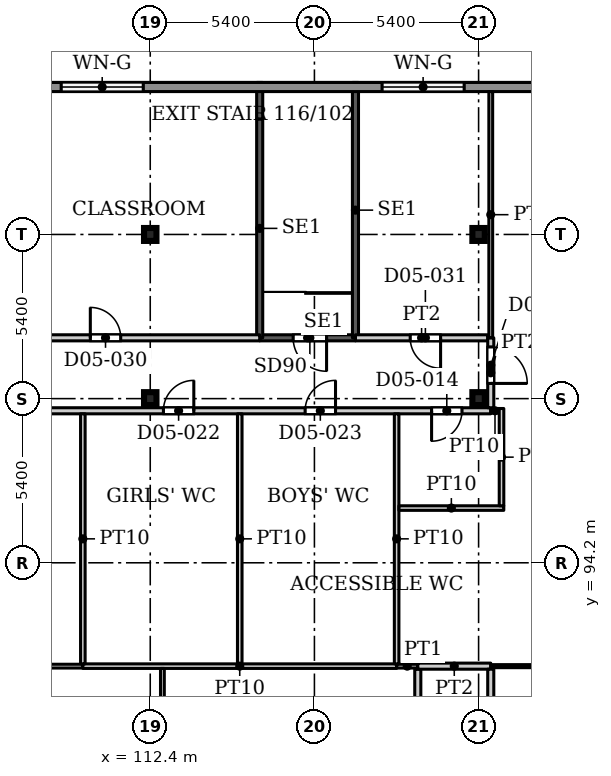
"""IFC4 building model, lengths in metres.
Left out: names, types, materials, properties, quantities, classifications, styles, units other than length and angle.
Written with IfcOpenShell. Run it as: python <this file> out.ifc"""

import sys

from ifc_helpers import new_model, si_unit, direction, frame, frame_2d, origin, origin_2d, place, context, subcontext, project, spatial, rectangle, i_section, extrude, source, transform, mapped, element, fill, save


model = new_model("IFC4")
c1 = context("Model", 3, precision=1e-05, world=origin(), true_north=direction((0.0, 1.0)))
c2 = subcontext(c1, "Body", "Model", "MODEL_VIEW")
j1 = project(units=[si_unit("LENGTHUNIT", "METRE"), si_unit("PLANEANGLEUNIT", "RADIAN")], contexts=[c1])
p1 = place(None, origin())
s1 = spatial("IfcSite", under=j1, at=p1, CompositionType="ELEMENT")
p2 = place(p1, origin())
s2 = spatial("IfcBuilding", under=s1, at=p2, CompositionType="ELEMENT")
p3 = place(p2, frame((0.0, 0.0, 26.0)))
s3 = spatial("IfcBuildingStorey", under=s2, at=p3, CompositionType="ELEMENT", Elevation=26.0)
for number, where, z_axis, x_axis in (
    (1, (112.4, 99.6, 0.0), (0.0, 0.0, 1.0), (1.0, 0.0, 0.0)),
    (2, (123.2, 99.6, 0.0), (0.0, 0.0, 1.0), (1.0, 0.0, 0.0)),
    (3, (112.4, 105.0, 0.0), (0.0, 0.0, 1.0), (1.0, 0.0, 0.0)),
    (4, (123.2, 105.0, 0.0), (0.0, 0.0, 1.0), (1.0, 0.0, 0.0)),
):
    element("IfcColumn", number, at=place(p3, frame(where, z_axis=z_axis, x_axis=x_axis)), inside=s3, PredefinedType="COLUMN", context=c2, shape_type="SweptSolid", body=[
        extrude(i_section(OverallWidth=0.409, OverallDepth=0.425, WebThickness=0.033, FlangeThickness=0.052, FilletRadius=0.013, at=origin_2d()), origin(), (0.0, 0.0, 1.0), 4.5),
    ])
p4 = place(p3, frame((78.48, 109.85, 0.0), z_axis=(0.0, 0.0, 1.0), x_axis=(1.0, 0.0, 0.0)))
e5 = element("IfcWall", 5, at=p4, inside=s3, PredefinedType="SOLIDWALL", context=c2, shape_type="SweptSolid", body=[
    extrude(rectangle(XDim=47.52, YDim=0.3, at=frame_2d((23.76, 0.0))), origin(), (0.0, 0.0, 1.0), 4.25),
])
p5 = place(p4, frame((1.045, 0.0, 2.4)))
e6 = element("IfcOpeningElement", 6, at=p5, cuts=e5, PredefinedType="OPENING", context=c2, shape_type="SweptSolid", body=[
    extrude(rectangle(XDim=2.7, YDim=1.2, at=frame_2d((1.35, 0.6))), frame((0.0, 0.16, 0.0), z_axis=(0.0, -1.0, 0.0), x_axis=(1.0, 0.0, 0.0)), (0.0, 0.0, 1.0), 0.32),
])
p6 = place(p4, frame((6.28, 0.0, 2.4)))
e7 = element("IfcOpeningElement", 7, at=p6, cuts=e5, PredefinedType="OPENING", context=c2, shape_type="SweptSolid", body=[
    extrude(rectangle(XDim=2.7, YDim=1.2, at=frame_2d((1.35, 0.6))), frame((0.0, 0.16, 0.0), z_axis=(0.0, -1.0, 0.0), x_axis=(1.0, 0.0, 0.0)), (0.0, 0.0, 1.0), 0.32),
])
p7 = place(p4, frame((15.765, 0.0, 2.4)))
e8 = element("IfcOpeningElement", 8, at=p7, cuts=e5, PredefinedType="OPENING", context=c2, shape_type="SweptSolid", body=[
    extrude(rectangle(XDim=2.7, YDim=1.2, at=frame_2d((1.35, 0.6))), frame((0.0, 0.16, 0.0), z_axis=(0.0, -1.0, 0.0), x_axis=(1.0, 0.0, 0.0)), (0.0, 0.0, 1.0), 0.32),
])
p8 = place(p4, frame((22.47, 0.0, 2.4)))
e9 = element("IfcOpeningElement", 9, at=p8, cuts=e5, PredefinedType="OPENING", context=c2, shape_type="SweptSolid", body=[
    extrude(rectangle(XDim=2.7, YDim=1.2, at=frame_2d((1.35, 0.6))), frame((0.0, 0.16, 0.0), z_axis=(0.0, -1.0, 0.0), x_axis=(1.0, 0.0, 0.0)), (0.0, 0.0, 1.0), 0.32),
])
p9 = place(p4, frame((30.99, 0.0, 2.4)))
e10 = element("IfcOpeningElement", 10, at=p9, cuts=e5, PredefinedType="OPENING", context=c2, shape_type="SweptSolid", body=[
    extrude(rectangle(XDim=2.7, YDim=1.2, at=frame_2d((1.35, 0.6))), frame((0.0, 0.16, 0.0), z_axis=(0.0, -1.0, 0.0), x_axis=(1.0, 0.0, 0.0)), (0.0, 0.0, 1.0), 0.32),
])
p10 = place(p4, frame((41.545, 0.0, 2.4)))
e11 = element("IfcOpeningElement", 11, at=p10, cuts=e5, PredefinedType="OPENING", context=c2, shape_type="SweptSolid", body=[
    extrude(rectangle(XDim=2.7, YDim=1.2, at=frame_2d((1.35, 0.6))), frame((0.0, 0.16, 0.0), z_axis=(0.0, -1.0, 0.0), x_axis=(1.0, 0.0, 0.0)), (0.0, 0.0, 1.0), 0.32),
])
p11 = place(p3, frame((116.0, 101.6, 0.0), z_axis=(0.0, 0.0, 1.0), x_axis=(1.0, 0.0, 0.0)))
e12 = element("IfcWall", 12, at=p11, inside=s3, PredefinedType="SHEAR", context=c2, shape_type="SweptSolid", body=[
    extrude(rectangle(XDim=3.15, YDim=0.2, at=frame_2d((1.575, 0.0))), origin(), (0.0, 0.0, 1.0), 4.5),
])
p12 = place(p11, frame((1.1, 0.0, 0.0)))
e13 = element("IfcOpeningElement", 13, at=p12, cuts=e12, PredefinedType="OPENING", context=c2, shape_type="SweptSolid", body=[
    extrude(rectangle(XDim=1.1, YDim=2.2, at=frame_2d((0.55, 1.1))), frame((0.0, 0.11, 0.0), z_axis=(0.0, -1.0, 0.0), x_axis=(1.0, 0.0, 0.0)), (0.0, 0.0, 1.0), 0.22),
])
p13 = place(p3, frame((116.0, 101.6, 0.0), z_axis=(0.0, 0.0, 1.0), x_axis=(0.0, 1.0, 0.0)))
e14 = element("IfcWall", 14, at=p13, inside=s3, PredefinedType="SHEAR", context=c2, shape_type="SweptSolid", body=[
    extrude(rectangle(XDim=7.2, YDim=0.2, at=frame_2d((3.6, 0.0))), origin(), (0.0, 0.0, 1.0), 4.5),
])
p14 = place(p3, frame((116.0, 108.8, 0.0), z_axis=(0.0, 0.0, 1.0), x_axis=(0.0, 1.0, 0.0)))
e15 = element("IfcWall", 15, at=p14, inside=s3, PredefinedType="SHEAR", context=c2, shape_type="SweptSolid", body=[
    extrude(rectangle(XDim=1.2, YDim=0.2, at=frame_2d((0.6, 0.0))), origin(), (0.0, 0.0, 1.0), 4.5),
])
p15 = place(p3, frame((119.15, 101.6, 0.0), z_axis=(0.0, 0.0, 1.0), x_axis=(0.0, 1.0, 0.0)))
e16 = element("IfcWall", 16, at=p15, inside=s3, PredefinedType="SHEAR", context=c2, shape_type="SweptSolid", body=[
    extrude(rectangle(XDim=8.4, YDim=0.2, at=frame_2d((4.2, 0.0))), origin(), (0.0, 0.0, 1.0), 4.5),
])
p16 = place(p3, frame((56.1, 99.2, 0.0), z_axis=(0.0, 0.0, 1.0), x_axis=(1.0, 0.0, 0.0)))
e17 = element("IfcWall", 17, at=p16, inside=s3, PredefinedType="PARTITIONING", context=c2, shape_type="SweptSolid", body=[
    extrude(rectangle(XDim=67.5, YDim=0.2, at=frame_2d((33.75, 0.0))), origin(), (0.0, 0.0, 1.0), 4.2),
])
p17 = place(p16, frame((4.05, 0.0, 0.0)))
e18 = element("IfcOpeningElement", 18, at=p17, cuts=e17, PredefinedType="OPENING", context=c2, shape_type="SweptSolid", body=[
    extrude(rectangle(XDim=1.0, YDim=2.1, at=frame_2d((0.5, 1.05))), frame((0.0, 0.11, 0.0), z_axis=(0.0, -1.0, 0.0), x_axis=(1.0, 0.0, 0.0)), (0.0, 0.0, 1.0), 0.22),
])
p18 = place(p16, frame((65.554, 0.0, 0.0)))
e19 = element("IfcOpeningElement", 19, at=p18, cuts=e17, PredefinedType="OPENING", context=c2, shape_type="SweptSolid", body=[
    extrude(rectangle(XDim=1.0, YDim=2.1, at=frame_2d((0.5, 1.05))), frame((0.0, 0.11, 0.0), z_axis=(0.0, -1.0, 0.0), x_axis=(1.0, 0.0, 0.0)), (0.0, 0.0, 1.0), 0.22),
])
p19 = place(p16, frame((11.589, 0.0, 0.0)))
e20 = element("IfcOpeningElement", 20, at=p19, cuts=e17, PredefinedType="OPENING", context=c2, shape_type="SweptSolid", body=[
    extrude(rectangle(XDim=1.0, YDim=2.1, at=frame_2d((0.5, 1.05))), frame((0.0, 0.11, 0.0), z_axis=(0.0, -1.0, 0.0), x_axis=(1.0, 0.0, 0.0)), (0.0, 0.0, 1.0), 0.22),
])
p20 = place(p16, frame((20.329, 0.0, 0.0)))
e21 = element("IfcOpeningElement", 21, at=p20, cuts=e17, PredefinedType="OPENING", context=c2, shape_type="SweptSolid", body=[
    extrude(rectangle(XDim=1.0, YDim=2.1, at=frame_2d((0.5, 1.05))), frame((0.0, 0.11, 0.0), z_axis=(0.0, -1.0, 0.0), x_axis=(1.0, 0.0, 0.0)), (0.0, 0.0, 1.0), 0.22),
])
p21 = place(p16, frame((27.319, 0.0, 0.0)))
e22 = element("IfcOpeningElement", 22, at=p21, cuts=e17, PredefinedType="OPENING", context=c2, shape_type="SweptSolid", body=[
    extrude(rectangle(XDim=1.0, YDim=2.1, at=frame_2d((0.5, 1.05))), frame((0.0, 0.11, 0.0), z_axis=(0.0, -1.0, 0.0), x_axis=(1.0, 0.0, 0.0)), (0.0, 0.0, 1.0), 0.22),
])
p22 = place(p16, frame((33.262, 0.0, 0.0)))
e23 = element("IfcOpeningElement", 23, at=p22, cuts=e17, PredefinedType="OPENING", context=c2, shape_type="SweptSolid", body=[
    extrude(rectangle(XDim=1.0, YDim=2.1, at=frame_2d((0.5, 1.05))), frame((0.0, 0.11, 0.0), z_axis=(0.0, -1.0, 0.0), x_axis=(1.0, 0.0, 0.0)), (0.0, 0.0, 1.0), 0.22),
])
p23 = place(p16, frame((42.002, 0.0, 0.0)))
e24 = element("IfcOpeningElement", 24, at=p23, cuts=e17, PredefinedType="OPENING", context=c2, shape_type="SweptSolid", body=[
    extrude(rectangle(XDim=1.0, YDim=2.1, at=frame_2d((0.5, 1.05))), frame((0.0, 0.11, 0.0), z_axis=(0.0, -1.0, 0.0), x_axis=(1.0, 0.0, 0.0)), (0.0, 0.0, 1.0), 0.22),
])
p24 = place(p16, frame((49.743, 0.0, 0.0)))
e25 = element("IfcOpeningElement", 25, at=p24, cuts=e17, PredefinedType="OPENING", context=c2, shape_type="SweptSolid", body=[
    extrude(rectangle(XDim=1.0, YDim=2.1, at=frame_2d((0.5, 1.05))), frame((0.0, 0.11, 0.0), z_axis=(0.0, -1.0, 0.0), x_axis=(1.0, 0.0, 0.0)), (0.0, 0.0, 1.0), 0.22),
])
p25 = place(p16, frame((56.733, 0.0, 0.0)))
e26 = element("IfcOpeningElement", 26, at=p25, cuts=e17, PredefinedType="OPENING", context=c2, shape_type="SweptSolid", body=[
    extrude(rectangle(XDim=1.0, YDim=2.1, at=frame_2d((0.5, 1.05))), frame((0.0, 0.11, 0.0), z_axis=(0.0, -1.0, 0.0), x_axis=(1.0, 0.0, 0.0)), (0.0, 0.0, 1.0), 0.22),
])
p26 = place(p16, frame((61.394, 0.0, 0.0)))
e27 = element("IfcOpeningElement", 27, at=p26, cuts=e17, PredefinedType="OPENING", context=c2, shape_type="SweptSolid", body=[
    extrude(rectangle(XDim=1.0, YDim=2.1, at=frame_2d((0.5, 1.05))), frame((0.0, 0.11, 0.0), z_axis=(0.0, -1.0, 0.0), x_axis=(1.0, 0.0, 0.0)), (0.0, 0.0, 1.0), 0.22),
])
p27 = place(p3, frame((82.0, 90.8, 0.0), z_axis=(0.0, 0.0, 1.0), x_axis=(1.0, 0.0, 0.0)))
e28 = element("IfcWall", 28, at=p27, inside=s3, PredefinedType="PARTITIONING", context=c2, shape_type="SweptSolid", body=[
    extrude(rectangle(XDim=28.183, YDim=0.125, at=frame_2d((14.092, 0.0))), origin(), (0.0, 0.0, 1.0), 4.2),
])
p28 = place(p3, frame((93.15, 101.6, 0.0), z_axis=(0.0, 0.0, 1.0), x_axis=(1.0, 0.0, 0.0)))
e29 = element("IfcWall", 29, at=p28, inside=s3, PredefinedType="PARTITIONING", context=c2, shape_type="SweptSolid", body=[
    extrude(rectangle(XDim=22.85, YDim=0.2, at=frame_2d((11.425, 0.0))), origin(), (0.0, 0.0, 1.0), 4.2),
])
p29 = place(p28, frame((1.987, 0.0, 0.0)))
e30 = element("IfcOpeningElement", 30, at=p29, cuts=e29, PredefinedType="OPENING", context=c2, shape_type="SweptSolid", body=[
    extrude(rectangle(XDim=1.0, YDim=2.1, at=frame_2d((0.5, 1.05))), frame((0.0, 0.11, 0.0), z_axis=(0.0, -1.0, 0.0), x_axis=(1.0, 0.0, 0.0)), (0.0, 0.0, 1.0), 0.22),
])
p30 = place(p28, frame((8.758, 0.0, 0.0)))
e31 = element("IfcOpeningElement", 31, at=p30, cuts=e29, PredefinedType="OPENING", context=c2, shape_type="SweptSolid", body=[
    extrude(rectangle(XDim=1.0, YDim=2.1, at=frame_2d((0.5, 1.05))), frame((0.0, 0.11, 0.0), z_axis=(0.0, -1.0, 0.0), x_axis=(1.0, 0.0, 0.0)), (0.0, 0.0, 1.0), 0.22),
])
p31 = place(p28, frame((17.279, 0.0, 0.0)))
e32 = element("IfcOpeningElement", 32, at=p31, cuts=e29, PredefinedType="OPENING", context=c2, shape_type="SweptSolid", body=[
    extrude(rectangle(XDim=1.0, YDim=2.1, at=frame_2d((0.5, 1.05))), frame((0.0, 0.11, 0.0), z_axis=(0.0, -1.0, 0.0), x_axis=(1.0, 0.0, 0.0)), (0.0, 0.0, 1.0), 0.22),
])
p32 = place(p3, frame((110.183, 90.8, 0.0), z_axis=(0.0, 0.0, 1.0), x_axis=(1.0, 0.0, 0.0)))
e33 = element("IfcWall", 33, at=p32, inside=s3, PredefinedType="PARTITIONING", context=c2, shape_type="SweptSolid", body=[
    extrude(rectangle(XDim=10.321, YDim=0.15, at=frame_2d((5.16, 0.0))), origin(), (0.0, 0.0, 1.0), 4.2),
])
p33 = place(p3, frame((110.183, 90.875, 0.0), z_axis=(0.0, 0.0, 1.0), x_axis=(0.0, 1.0, 0.0)))
e34 = element("IfcWall", 34, at=p33, inside=s3, PredefinedType="PARTITIONING", context=c2, shape_type="SweptSolid", body=[
    extrude(rectangle(XDim=8.225, YDim=0.15, at=frame_2d((4.113, 0.0))), origin(), (0.0, 0.0, 1.0), 4.2),
])
p34 = place(p3, frame((112.8, 43.938, 0.0), z_axis=(0.0, 0.0, 1.0), x_axis=(0.0, 1.0, 0.0)))
e35 = element("IfcWall", 35, at=p34, inside=s3, PredefinedType="PARTITIONING", context=c2, shape_type="SweptSolid", body=[
    extrude(rectangle(XDim=46.787, YDim=0.125, at=frame_2d((23.394, 0.0))), origin(), (0.0, 0.0, 1.0), 4.2),
])
p35 = place(p3, frame((115.344, 90.875, 0.0), z_axis=(0.0, 0.0, 1.0), x_axis=(0.0, 1.0, 0.0)))
e36 = element("IfcWall", 36, at=p35, inside=s3, PredefinedType="PARTITIONING", context=c2, shape_type="SweptSolid", body=[
    extrude(rectangle(XDim=8.225, YDim=0.15, at=frame_2d((4.113, 0.0))), origin(), (0.0, 0.0, 1.0), 4.2),
])
p36 = place(p3, frame((119.15, 101.6, 0.0), z_axis=(0.0, 0.0, 1.0), x_axis=(1.0, 0.0, 0.0)))
e37 = element("IfcWall", 37, at=p36, inside=s3, PredefinedType="PARTITIONING", context=c2, shape_type="SweptSolid", body=[
    extrude(rectangle(XDim=4.35, YDim=0.2, at=frame_2d((2.175, 0.0))), origin(), (0.0, 0.0, 1.0), 4.2),
])
p37 = place(p36, frame((1.8, 0.0, 0.0)))
e38 = element("IfcOpeningElement", 38, at=p37, cuts=e37, PredefinedType="OPENING", context=c2, shape_type="SweptSolid", body=[
    extrude(rectangle(XDim=1.0, YDim=2.1, at=frame_2d((0.5, 1.05))), frame((0.0, 0.11, 0.0), z_axis=(0.0, -1.0, 0.0), x_axis=(1.0, 0.0, 0.0)), (0.0, 0.0, 1.0), 0.22),
])
p38 = place(p3, frame((120.504, 90.8, 0.0), z_axis=(0.0, 0.0, 1.0), x_axis=(1.0, 0.0, 0.0)))
e39 = element("IfcWall", 39, at=p38, inside=s3, PredefinedType="PARTITIONING", context=c2, shape_type="SweptSolid", body=[
    extrude(rectangle(XDim=0.696, YDim=0.125, at=frame_2d((0.348, 0.0))), origin(), (0.0, 0.0, 1.0), 4.2),
])
p39 = place(p3, frame((120.504, 90.875, 0.0), z_axis=(0.0, 0.0, 1.0), x_axis=(0.0, 1.0, 0.0)))
e40 = element("IfcWall", 40, at=p39, inside=s3, PredefinedType="PARTITIONING", context=c2, shape_type="SweptSolid", body=[
    extrude(rectangle(XDim=8.225, YDim=0.15, at=frame_2d((4.113, 0.0))), origin(), (0.0, 0.0, 1.0), 4.2),
])
p40 = place(p3, frame((120.579, 96.0, 0.0), z_axis=(0.0, 0.0, 1.0), x_axis=(1.0, 0.0, 0.0)))
e41 = element("IfcWall", 41, at=p40, inside=s3, PredefinedType="PARTITIONING", context=c2, shape_type="SweptSolid", body=[
    extrude(rectangle(XDim=3.45, YDim=0.15, at=frame_2d((1.725, 0.0))), origin(), (0.0, 0.0, 1.0), 4.2),
])
p41 = place(p3, frame((121.2, 74.6, 0.0), z_axis=(0.0, 0.0, 1.0), x_axis=(0.0, 1.0, 0.0)))
e42 = element("IfcWall", 42, at=p41, inside=s3, PredefinedType="PARTITIONING", context=c2, shape_type="SweptSolid", body=[
    extrude(rectangle(XDim=16.1, YDim=0.2, at=frame_2d((8.05, 0.0))), origin(), (0.0, 0.0, 1.0), 4.2),
])
p42 = place(p41, frame((3.987, 0.0, 0.0)))
e43 = element("IfcOpeningElement", 43, at=p42, cuts=e42, PredefinedType="OPENING", context=c2, shape_type="SweptSolid", body=[
    extrude(rectangle(XDim=1.0, YDim=2.1, at=frame_2d((0.5, 1.05))), frame((0.0, 0.11, 0.0), z_axis=(0.0, -1.0, 0.0), x_axis=(1.0, 0.0, 0.0)), (0.0, 0.0, 1.0), 0.22),
])
p43 = place(p41, frame((12.05, 0.0, 0.0)))
e44 = element("IfcOpeningElement", 44, at=p43, cuts=e42, PredefinedType="OPENING", context=c2, shape_type="SweptSolid", body=[
    extrude(rectangle(XDim=1.0, YDim=2.1, at=frame_2d((0.5, 1.05))), frame((0.0, 0.11, 0.0), z_axis=(0.0, -1.0, 0.0), x_axis=(1.0, 0.0, 0.0)), (0.0, 0.0, 1.0), 0.22),
])
p44 = place(p3, frame((121.2, 90.8, 0.0), z_axis=(0.0, 0.0, 1.0), x_axis=(1.0, 0.0, 0.0)))
e45 = element("IfcWall", 45, at=p44, inside=s3, PredefinedType="PARTITIONING", context=c2, shape_type="SweptSolid", body=[
    extrude(rectangle(XDim=2.4, YDim=0.2, at=frame_2d((1.2, 0.0))), origin(), (0.0, 0.0, 1.0), 4.2),
])
p45 = place(p3, frame((123.6, 69.15, 0.0), z_axis=(0.0, 0.0, 1.0), x_axis=(0.0, 1.0, 0.0)))
e46 = element("IfcWall", 46, at=p45, inside=s3, PredefinedType="PARTITIONING", context=c2, shape_type="SweptSolid", body=[
    extrude(rectangle(XDim=21.55, YDim=0.2, at=frame_2d((10.775, 0.0))), origin(), (0.0, 0.0, 1.0), 4.2),
])
p46 = place(p45, frame((4.4, 0.0, 0.0)))
e47 = element("IfcOpeningElement", 47, at=p46, cuts=e46, PredefinedType="OPENING", context=c2, shape_type="SweptSolid", body=[
    extrude(rectangle(XDim=1.0, YDim=2.1, at=frame_2d((0.5, 1.05))), frame((0.0, 0.11, 0.0), z_axis=(0.0, -1.0, 0.0), x_axis=(1.0, 0.0, 0.0)), (0.0, 0.0, 1.0), 0.22),
])
p47 = place(p45, frame((15.238, 0.0, 0.0)))
e48 = element("IfcOpeningElement", 48, at=p47, cuts=e46, PredefinedType="OPENING", context=c2, shape_type="SweptSolid", body=[
    extrude(rectangle(XDim=1.0, YDim=2.1, at=frame_2d((0.5, 1.05))), frame((0.0, 0.11, 0.0), z_axis=(0.0, -1.0, 0.0), x_axis=(1.0, 0.0, 0.0)), (0.0, 0.0, 1.0), 0.22),
])
p48 = place(p45, frame((11.238, 0.0, 0.0)))
e49 = element("IfcOpeningElement", 49, at=p48, cuts=e46, PredefinedType="OPENING", context=c2, shape_type="SweptSolid", body=[
    extrude(rectangle(XDim=1.2, YDim=2.1, at=frame_2d((0.6, 1.05))), frame((0.0, 0.11, 0.0), z_axis=(0.0, -1.0, 0.0), x_axis=(1.0, 0.0, 0.0)), (0.0, 0.0, 1.0), 0.22),
])
p49 = place(p3, frame((123.6, 90.8, 0.0), z_axis=(0.0, 0.0, 1.0), x_axis=(1.0, 0.0, 0.0)))
e50 = element("IfcWall", 50, at=p49, inside=s3, PredefinedType="PARTITIONING", context=c2, shape_type="SweptSolid", body=[
    extrude(rectangle(XDim=8.4, YDim=0.1, at=frame_2d((4.2, 0.0))), origin(), (0.0, 0.0, 1.0), 4.2),
])
p50 = place(p3, frame((123.6, 99.2, 0.0), z_axis=(0.0, 0.0, 1.0), x_axis=(1.0, 0.0, 0.0)))
e51 = element("IfcWall", 51, at=p50, inside=s3, PredefinedType="PARTITIONING", context=c2, shape_type="SweptSolid", body=[
    extrude(rectangle(XDim=0.279, YDim=0.15, at=frame_2d((0.139, 0.0))), origin(), (0.0, 0.0, 1.0), 4.2),
])
p51 = place(p3, frame((123.6, 99.3, 0.0), z_axis=(0.0, 0.0, 1.0), x_axis=(0.0, 1.0, 0.0)))
e52 = element("IfcWall", 52, at=p51, inside=s3, PredefinedType="PARTITIONING", context=c2, shape_type="SweptSolid", body=[
    extrude(rectangle(XDim=2.3, YDim=0.2, at=frame_2d((1.15, 0.0))), origin(), (0.0, 0.0, 1.0), 4.2),
])
p52 = place(p51, frame((0.8, 0.0, 0.0)))
e53 = element("IfcOpeningElement", 53, at=p52, cuts=e52, PredefinedType="OPENING", context=c2, shape_type="SweptSolid", body=[
    extrude(rectangle(XDim=1.2, YDim=2.1, at=frame_2d((0.6, 1.05))), frame((0.0, 0.11, 0.0), z_axis=(0.0, -1.0, 0.0), x_axis=(1.0, 0.0, 0.0)), (0.0, 0.0, 1.0), 0.22),
])
p53 = place(p3, frame((123.6, 101.6, 0.0), z_axis=(0.0, 0.0, 1.0), x_axis=(0.0, 1.0, 0.0)))
e54 = element("IfcWall", 54, at=p53, inside=s3, PredefinedType="PARTITIONING", context=c2, shape_type="SweptSolid", body=[
    extrude(rectangle(XDim=8.101, YDim=0.125, at=frame_2d((4.05, 0.0))), origin(), (0.0, 0.0, 1.0), 4.2),
])
p54 = place(p3, frame((123.954, 96.075, 0.0), z_axis=(0.0, 0.0, 1.0), x_axis=(0.0, 1.0, 0.0)))
e55 = element("IfcWall", 55, at=p54, inside=s3, PredefinedType="PARTITIONING", context=c2, shape_type="SweptSolid", body=[
    extrude(rectangle(XDim=3.2, YDim=0.15, at=frame_2d((1.6, 0.0))), origin(), (0.0, 0.0, 1.0), 4.2),
])
m1 = source(origin(), c2, "Body", "SweptSolid", [
    extrude(rectangle(XDim=2.7, YDim=1.2, at=frame_2d((1.35, 0.6))), frame((0.0, 0.03, 0.0), z_axis=(0.0, -1.0, 0.0), x_axis=(1.0, 0.0, 0.0)), (0.0, 0.0, 1.0), 0.06),
])
p55 = place(p9, origin())
e56 = element("IfcWindow", 56, at=p55, inside=s3, PartitioningType="SINGLE_PANEL", PredefinedType="WINDOW", context=c2, shape_type="MappedRepresentation", body=[
    mapped(m1, transform((0.0, 0.0, 0.0), x_axis=(1.0, 0.0, 0.0), y_axis=(0.0, 1.0, 0.0), z_axis=(0.0, 0.0, 1.0), scale=1.0)),
])
fill(e10, e56)
p56 = place(p10, origin())
e57 = element("IfcWindow", 57, at=p56, inside=s3, PartitioningType="SINGLE_PANEL", PredefinedType="WINDOW", context=c2, shape_type="MappedRepresentation", body=[
    mapped(m1, transform((0.0, 0.0, 0.0), x_axis=(1.0, 0.0, 0.0), y_axis=(0.0, 1.0, 0.0), z_axis=(0.0, 0.0, 1.0), scale=1.0)),
])
fill(e11, e57)
m2 = source(origin(), c2, "Body", "SweptSolid", [
    extrude(rectangle(XDim=1.1, YDim=2.2, at=frame_2d((0.55, 1.1))), frame((0.0, 0.025, 0.0), z_axis=(0.0, -1.0, 0.0), x_axis=(1.0, 0.0, 0.0)), (0.0, 0.0, 1.0), 0.05),
])
p57 = place(p12, origin())
e58 = element("IfcDoor", 58, at=p57, inside=s3, OperationType="SINGLE_SWING_RIGHT", PredefinedType="DOOR", context=c2, shape_type="MappedRepresentation", body=[
    mapped(m2, transform((0.0, 0.0, 0.0), x_axis=(1.0, 0.0, 0.0), y_axis=(0.0, 1.0, 0.0), z_axis=(0.0, 0.0, 1.0), scale=1.0)),
])
fill(e13, e58)
m3 = source(origin(), c2, "Body", "SweptSolid", [
    extrude(rectangle(XDim=1.0, YDim=2.1, at=frame_2d((0.5, 1.05))), frame((0.0, 0.025, 0.0), z_axis=(0.0, -1.0, 0.0), x_axis=(1.0, 0.0, 0.0)), (0.0, 0.0, 1.0), 0.05),
])
p58 = place(p18, origin())
e59 = element("IfcDoor", 59, at=p58, inside=s3, OperationType="SINGLE_SWING_RIGHT", PredefinedType="DOOR", context=c2, shape_type="MappedRepresentation", body=[
    mapped(m3, transform((0.0, 0.0, 0.0), x_axis=(1.0, 0.0, 0.0), y_axis=(0.0, 1.0, 0.0), z_axis=(0.0, 0.0, 1.0), scale=1.0)),
])
fill(e19, e59)
m4 = source(origin(), c2, "Body", "SweptSolid", [
    extrude(rectangle(XDim=1.2, YDim=2.1, at=frame_2d((0.6, 1.05))), frame((0.0, 0.025, 0.0), z_axis=(0.0, -1.0, 0.0), x_axis=(1.0, 0.0, 0.0)), (0.0, 0.0, 1.0), 0.05),
])
p59 = place(p52, origin())
e60 = element("IfcDoor", 60, at=p59, inside=s3, OperationType="SINGLE_SWING_RIGHT", PredefinedType="DOOR", context=c2, shape_type="MappedRepresentation", body=[
    mapped(m4, transform((0.0, 0.0, 0.0), x_axis=(1.0, 0.0, 0.0), y_axis=(0.0, 1.0, 0.0), z_axis=(0.0, 0.0, 1.0), scale=1.0)),
])
fill(e53, e60)
p60 = place(p25, origin())
e61 = element("IfcDoor", 61, at=p60, inside=s3, OperationType="SINGLE_SWING_LEFT", PredefinedType="DOOR", context=c2, shape_type="MappedRepresentation", body=[
    mapped(m3, transform((0.0, 0.0, 0.0), x_axis=(1.0, 0.0, 0.0), y_axis=(0.0, 1.0, 0.0), z_axis=(0.0, 0.0, 1.0), scale=1.0)),
])
fill(e26, e61)
p61 = place(p26, origin())
e62 = element("IfcDoor", 62, at=p61, inside=s3, OperationType="SINGLE_SWING_LEFT", PredefinedType="DOOR", context=c2, shape_type="MappedRepresentation", body=[
    mapped(m3, transform((0.0, 0.0, 0.0), x_axis=(1.0, 0.0, 0.0), y_axis=(0.0, 1.0, 0.0), z_axis=(0.0, 0.0, 1.0), scale=1.0)),
])
fill(e27, e62)
p62 = place(p31, origin())
e63 = element("IfcDoor", 63, at=p62, inside=s3, OperationType="SINGLE_SWING_LEFT", PredefinedType="DOOR", context=c2, shape_type="MappedRepresentation", body=[
    mapped(m3, transform((0.0, 0.0, 0.0), x_axis=(1.0, 0.0, 0.0), y_axis=(0.0, 1.0, 0.0), z_axis=(0.0, 0.0, 1.0), scale=1.0)),
])
fill(e32, e63)
p63 = place(p37, origin())
e64 = element("IfcDoor", 64, at=p63, inside=s3, OperationType="SINGLE_SWING_RIGHT", PredefinedType="DOOR", context=c2, shape_type="MappedRepresentation", body=[
    mapped(m3, transform((0.0, 0.0, 0.0), x_axis=(1.0, 0.0, 0.0), y_axis=(0.0, 1.0, 0.0), z_axis=(0.0, 0.0, 1.0), scale=1.0)),
])
fill(e38, e64)
save(model, sys.argv[1])
